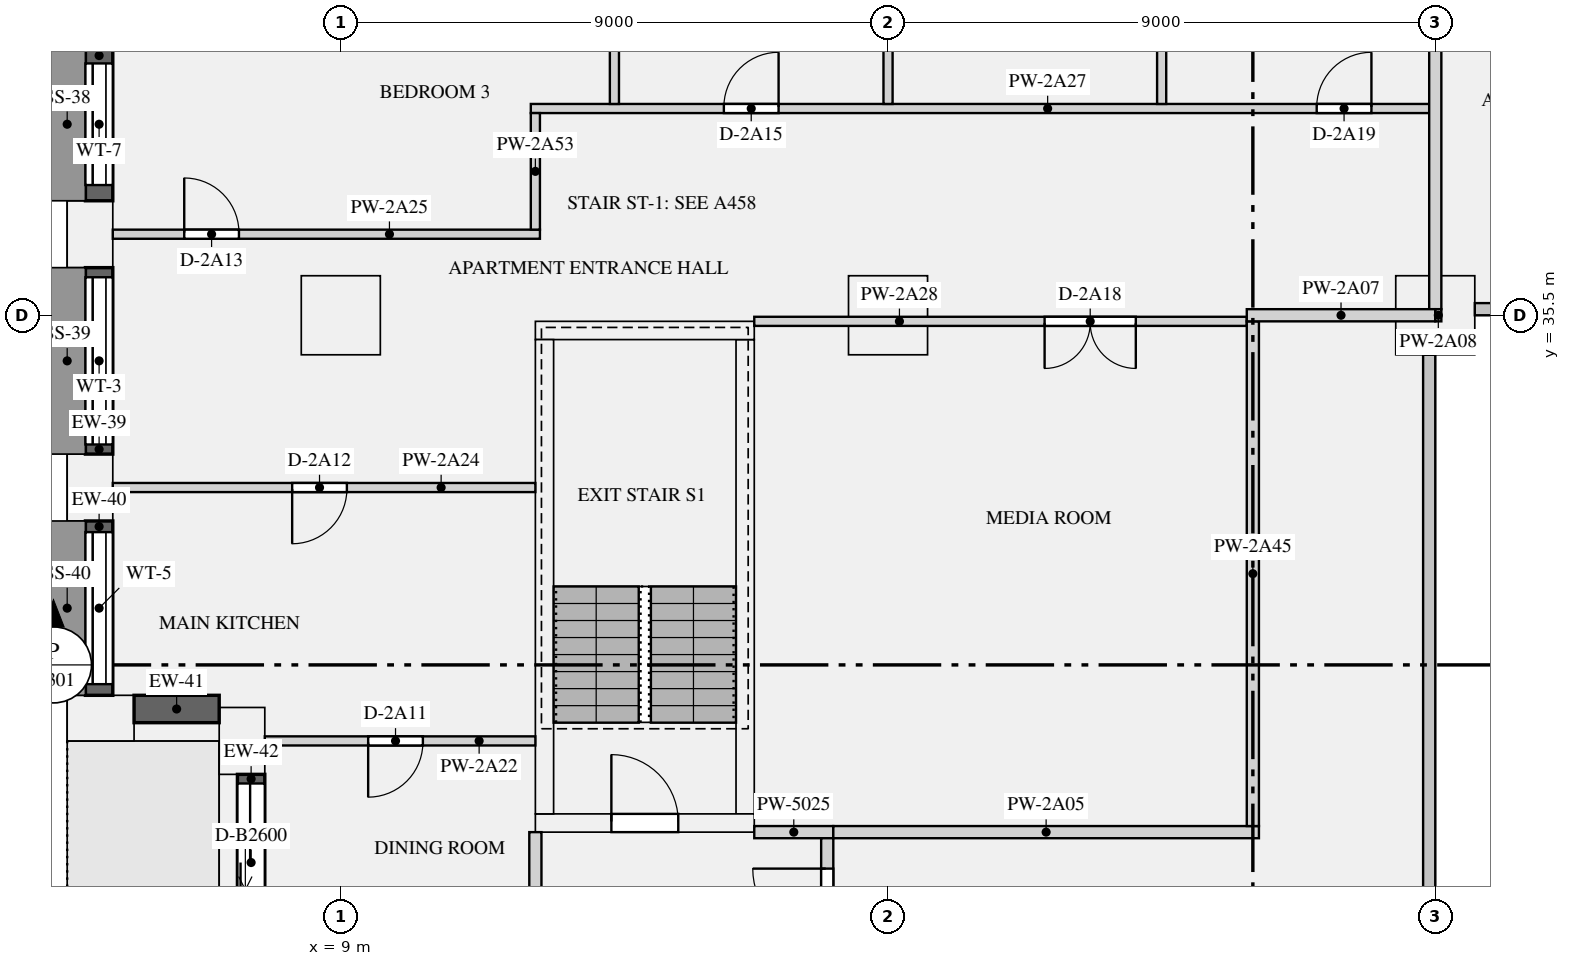
"""IFC4 building model, lengths in metres.
Left out: names, types, materials, properties, quantities, classifications, styles, units other than length and angle.
Written with IfcOpenShell. Run it as: python <this file> out.ifc"""

import sys

from ifc_helpers import new_model, si_unit, direction, frame, frame_2d, origin, origin_2d, place, context, subcontext, project, spatial, rectangle, extrude, element, fill, save


model = new_model("IFC4")
c1 = context("Model", 3, precision=1e-05, world=origin(), true_north=direction((0.0, 1.0)))
c2 = subcontext(c1, "Body", "Model", "MODEL_VIEW")
j1 = project(units=[si_unit("LENGTHUNIT", "METRE"), si_unit("PLANEANGLEUNIT", "RADIAN")], contexts=[c1])
p1 = place(None, origin())
s1 = spatial("IfcSite", under=j1, at=p1, CompositionType="ELEMENT")
p2 = place(p1, origin())
s2 = spatial("IfcBuilding", under=s1, at=p2, CompositionType="ELEMENT")
p3 = place(p2, frame((0.0, 0.0, 83.55)))
s3 = spatial("IfcBuildingStorey", under=s2, at=p3, CompositionType="ELEMENT", Elevation=83.55)
for number, where, z_axis, x_axis in (
    (1, (4.875, 36.833, 0.0), (0.0, 0.0, 1.0), (0.0, -1.0, 0.0)),
    (2, (4.875, 32.667, 0.0), (0.0, 0.0, 1.0), (0.0, -1.0, 0.0)),
    (3, (5.05, 28.875, 0.0), (0.0, 0.0, 1.0), (1.0, 0.0, 0.0)),
    (4, (7.375, 28.5, 0.0), (0.0, 0.0, 1.0), (0.0, -1.0, 0.0)),
):
    element("IfcColumn", number, at=place(p3, frame(where, z_axis=z_axis, x_axis=x_axis)), inside=s3, PredefinedType="USERDEFINED", context=c2, shape_type="SweptSolid", body=[
        extrude(rectangle(XDim=1.1, YDim=0.75, at=origin_2d()), origin(), (0.0, 0.0, 1.0), 3.15),
    ])
for number, where, z_axis, x_axis in (
    (5, (9.0, 35.5, 0.0), (0.0, 0.0, 1.0), (1.0, 0.0, 0.0)),
    (6, (18.0, 35.5, 0.0), (0.0, 0.0, 1.0), (1.0, 0.0, 0.0)),
    (7, (27.0, 35.5, 0.0), (0.0, 0.0, 1.0), (1.0, 0.0, 0.0)),
):
    element("IfcColumn", number, at=place(p3, frame(where, z_axis=z_axis, x_axis=x_axis)), inside=s3, PredefinedType="COLUMN", context=c2, shape_type="SweptSolid", body=[
        extrude(rectangle(XDim=1.3, YDim=1.3, at=origin_2d()), origin(), (0.0, 0.0, 1.0), 3.15),
    ])
p4 = place(p3, frame((12.2, 27.15, 0.0), z_axis=(0.0, 0.0, 1.0), x_axis=(1.0, 0.0, 0.0)))
e8 = element("IfcWall", 8, at=p4, inside=s3, PredefinedType="SHEAR", context=c2, shape_type="SweptSolid", body=[
    extrude(rectangle(XDim=3.6, YDim=0.3, at=frame_2d((1.8, 0.0))), origin(), (0.0, 0.0, 1.0), 3.15),
])
p5 = place(p4, frame((1.25, 0.0, 0.0)))
e9 = element("IfcOpeningElement", 9, at=p5, cuts=e8, PredefinedType="OPENING", context=c2, shape_type="SweptSolid", body=[
    extrude(rectangle(XDim=1.1, YDim=2.1, at=frame_2d((0.55, 1.05))), frame((0.0, 0.16, 0.0), z_axis=(0.0, -1.0, 0.0), x_axis=(1.0, 0.0, 0.0)), (0.0, 0.0, 1.0), 0.32),
])
p6 = place(p3, frame((12.2, 35.25, 0.0), z_axis=(0.0, 0.0, 1.0), x_axis=(1.0, 0.0, 0.0)))
e10 = element("IfcWall", 10, at=p6, inside=s3, PredefinedType="SHEAR", context=c2, shape_type="SweptSolid", body=[
    extrude(rectangle(XDim=3.6, YDim=0.3, at=frame_2d((1.8, 0.0))), origin(), (0.0, 0.0, 1.0), 3.15),
])
for number, where, z_axis, x_axis in (
    (11, (12.35, 27.3, 0.0), (0.0, 0.0, 1.0), (0.0, 1.0, 0.0)),
    (12, (15.65, 27.3, 0.0), (0.0, 0.0, 1.0), (0.0, 1.0, 0.0)),
):
    element("IfcWall", number, at=place(p3, frame(where, z_axis=z_axis, x_axis=x_axis)), inside=s3, PredefinedType="SHEAR", context=c2, shape_type="SweptSolid", body=[
        extrude(rectangle(XDim=7.8, YDim=0.3, at=frame_2d((3.9, 0.0))), origin(), (0.0, 0.0, 1.0), 3.15),
    ])
p7 = place(p3, frame((5.025, 39.9, 0.9), z_axis=(0.0, 0.0, 1.0), x_axis=(0.0, -1.0, 0.0)))
e13 = element("IfcWall", 13, at=p7, inside=s3, PredefinedType="SOLIDWALL", context=c2, shape_type="SweptSolid", body=[
    extrude(rectangle(XDim=2.517, YDim=0.45, at=frame_2d((1.258, 0.0))), origin(), (0.0, 0.0, 1.0), 1.93),
])
p8 = place(p7, frame((0.259, 0.0, 0.15)))
e14 = element("IfcOpeningElement", 14, at=p8, cuts=e13, PredefinedType="OPENING", context=c2, shape_type="SweptSolid", body=[
    extrude(rectangle(XDim=2.0, YDim=1.5, at=frame_2d((1.0, 0.75))), frame((0.0, 0.235, 0.0), z_axis=(0.0, -1.0, 0.0), x_axis=(1.0, 0.0, 0.0)), (0.0, 0.0, 1.0), 0.47),
])
p9 = place(p3, frame((5.025, 36.283, 0.9), z_axis=(0.0, 0.0, 1.0), x_axis=(0.0, -1.0, 0.0)))
e15 = element("IfcWall", 15, at=p9, inside=s3, PredefinedType="SOLIDWALL", context=c2, shape_type="SweptSolid", body=[
    extrude(rectangle(XDim=3.066, YDim=0.45, at=frame_2d((1.533, 0.0))), origin(), (0.0, 0.0, 1.0), 1.93),
])
p10 = place(p9, frame((0.158, 0.0, 0.15)))
e16 = element("IfcOpeningElement", 16, at=p10, cuts=e15, PredefinedType="OPENING", context=c2, shape_type="SweptSolid", body=[
    extrude(rectangle(XDim=2.75, YDim=1.5, at=frame_2d((1.375, 0.75))), frame((0.0, 0.235, 0.0), z_axis=(0.0, -1.0, 0.0), x_axis=(1.0, 0.0, 0.0)), (0.0, 0.0, 1.0), 0.47),
])
p11 = place(p3, frame((5.025, 32.117, 0.9), z_axis=(0.0, 0.0, 1.0), x_axis=(0.0, -1.0, 0.0)))
e17 = element("IfcWall", 17, at=p11, inside=s3, PredefinedType="SOLIDWALL", context=c2, shape_type="SweptSolid", body=[
    extrude(rectangle(XDim=2.867, YDim=0.45, at=frame_2d((1.434, 0.0))), origin(), (0.0, 0.0, 1.0), 1.93),
])
p12 = place(p11, frame((0.184, 0.0, 0.15)))
e18 = element("IfcOpeningElement", 18, at=p12, cuts=e17, PredefinedType="OPENING", context=c2, shape_type="SweptSolid", body=[
    extrude(rectangle(XDim=2.5, YDim=1.5, at=frame_2d((1.25, 0.75))), frame((0.0, 0.235, 0.0), z_axis=(0.0, -1.0, 0.0), x_axis=(1.0, 0.0, 0.0)), (0.0, 0.0, 1.0), 0.47),
])
p13 = place(p3, frame((5.6, 29.025, 0.9), z_axis=(0.0, 0.0, 1.0), x_axis=(1.0, 0.0, 0.0)))
e19 = element("IfcWall", 19, at=p13, inside=s3, PredefinedType="SOLIDWALL", context=c2, shape_type="SweptSolid", body=[
    extrude(rectangle(XDim=1.4, YDim=0.45, at=frame_2d((0.7, 0.0))), origin(), (0.0, 0.0, 1.0), 1.93),
])
p14 = place(p3, frame((7.525, 27.95, 0.0), z_axis=(0.0, 0.0, 1.0), x_axis=(0.0, -1.0, 0.0)))
e20 = element("IfcWall", 20, at=p14, inside=s3, PredefinedType="SOLIDWALL", context=c2, shape_type="SweptSolid", body=[
    extrude(rectangle(XDim=2.9, YDim=0.45, at=frame_2d((1.45, 0.0))), origin(), (0.0, 0.0, 1.0), 2.83),
])
p15 = place(p14, frame((0.15, 0.0, 0.0)))
e21 = element("IfcOpeningElement", 21, at=p15, cuts=e20, PredefinedType="OPENING", context=c2, shape_type="SweptSolid", body=[
    extrude(rectangle(XDim=2.6, YDim=2.3, at=frame_2d((1.3, 1.15))), frame((0.0, 0.235, 0.0), z_axis=(0.0, -1.0, 0.0), x_axis=(1.0, 0.0, 0.0)), (0.0, 0.0, 1.0), 0.47),
])
p16 = place(p3, frame((15.8, 27.0, 0.0), z_axis=(0.0, 0.0, 1.0), x_axis=(1.0, 0.0, 0.0)))
e22 = element("IfcWall", 22, at=p16, inside=s3, PredefinedType="PARTITIONING", context=c2, shape_type="SweptSolid", body=[
    extrude(rectangle(XDim=1.3, YDim=0.2, at=frame_2d((0.65, 0.0))), origin(), (0.0, 0.0, 1.0), 2.83),
])
p17 = place(p3, frame((12.2, 23.1, 0.0), z_axis=(0.0, 0.0, 1.0), x_axis=(0.0, 1.0, 0.0)))
e23 = element("IfcWall", 23, at=p17, inside=s3, PredefinedType="PARTITIONING", context=c2, shape_type="SweptSolid", body=[
    extrude(rectangle(XDim=3.9, YDim=0.2, at=frame_2d((1.95, 0.0))), origin(), (0.0, 0.0, 1.0), 2.83),
])
p18 = place(p3, frame((17.0, 23.1, 0.0), z_axis=(0.0, 0.0, 1.0), x_axis=(0.0, 1.0, 0.0)))
e24 = element("IfcWall", 24, at=p18, inside=s3, PredefinedType="PARTITIONING", context=c2, shape_type="SweptSolid", body=[
    extrude(rectangle(XDim=3.8, YDim=0.2, at=frame_2d((1.9, 0.0))), origin(), (0.0, 0.0, 1.0), 2.83),
])
p19 = place(p18, frame((2.1, 0.0, 0.0)))
e25 = element("IfcOpeningElement", 25, at=p19, cuts=e24, PredefinedType="OPENING", context=c2, shape_type="SweptSolid", body=[
    extrude(rectangle(XDim=1.2, YDim=2.1, at=frame_2d((0.6, 1.05))), frame((0.0, 0.11, 0.0), z_axis=(0.0, -1.0, 0.0), x_axis=(1.0, 0.0, 0.0)), (0.0, 0.0, 1.0), 0.22),
])
p20 = place(p3, frame((17.1, 27.0, 0.0), z_axis=(0.0, 0.0, 1.0), x_axis=(1.0, 0.0, 0.0)))
e26 = element("IfcWall", 26, at=p20, inside=s3, PredefinedType="PARTITIONING", context=c2, shape_type="SweptSolid", body=[
    extrude(rectangle(XDim=7.0, YDim=0.2, at=frame_2d((3.5, 0.0))), origin(), (0.0, 0.0, 1.0), 2.83),
])
p21 = place(p3, frame((23.9, 35.5, 0.0), z_axis=(0.0, 0.0, 1.0), x_axis=(1.0, 0.0, 0.0)))
e27 = element("IfcWall", 27, at=p21, inside=s3, PredefinedType="PARTITIONING", context=c2, shape_type="SweptSolid", body=[
    extrude(rectangle(XDim=3.1, YDim=0.2, at=frame_2d((1.55, 0.0))), origin(), (0.0, 0.0, 1.0), 2.83),
])
p22 = place(p3, frame((27.0, 35.5, 0.0), z_axis=(0.0, 0.0, 1.0), x_axis=(1.0, 0.0, 0.0)))
e28 = element("IfcWall", 28, at=p22, inside=s3, PredefinedType="PARTITIONING", context=c2, shape_type="SweptSolid", body=[
    extrude(rectangle(XDim=0.1, YDim=0.2, at=frame_2d((0.05, 0.0))), origin(), (0.0, 0.0, 1.0), 2.83),
])
p23 = place(p3, frame((7.75, 28.5, 0.0), z_axis=(0.0, 0.0, 1.0), x_axis=(1.0, 0.0, 0.0)))
e29 = element("IfcWall", 29, at=p23, inside=s3, PredefinedType="PARTITIONING", context=c2, shape_type="SweptSolid", body=[
    extrude(rectangle(XDim=4.45, YDim=0.15, at=frame_2d((2.225, 0.0))), origin(), (0.0, 0.0, 1.0), 2.83),
])
p24 = place(p23, frame((1.7, 0.0, 0.0)))
e30 = element("IfcOpeningElement", 30, at=p24, cuts=e29, PredefinedType="OPENING", context=c2, shape_type="SweptSolid", body=[
    extrude(rectangle(XDim=0.9, YDim=2.1, at=frame_2d((0.45, 1.05))), frame((0.0, 0.085, 0.0), z_axis=(0.0, -1.0, 0.0), x_axis=(1.0, 0.0, 0.0)), (0.0, 0.0, 1.0), 0.17),
])
p25 = place(p3, frame((5.25, 32.667, 0.0), z_axis=(0.0, 0.0, 1.0), x_axis=(1.0, 0.0, 0.0)))
e31 = element("IfcWall", 31, at=p25, inside=s3, PredefinedType="PARTITIONING", context=c2, shape_type="SweptSolid", body=[
    extrude(rectangle(XDim=6.95, YDim=0.15, at=frame_2d((3.475, 0.0))), origin(), (0.0, 0.0, 1.0), 2.83),
])
p26 = place(p25, frame((2.95, 0.0, 0.0)))
e32 = element("IfcOpeningElement", 32, at=p26, cuts=e31, PredefinedType="OPENING", context=c2, shape_type="SweptSolid", body=[
    extrude(rectangle(XDim=0.9, YDim=2.1, at=frame_2d((0.45, 1.05))), frame((0.0, 0.085, 0.0), z_axis=(0.0, -1.0, 0.0), x_axis=(1.0, 0.0, 0.0)), (0.0, 0.0, 1.0), 0.17),
])
p27 = place(p3, frame((5.25, 36.833, 0.0), z_axis=(0.0, 0.0, 1.0), x_axis=(1.0, 0.0, 0.0)))
e33 = element("IfcWall", 33, at=p27, inside=s3, PredefinedType="PARTITIONING", context=c2, shape_type="SweptSolid", body=[
    extrude(rectangle(XDim=7.025, YDim=0.15, at=frame_2d((3.512, 0.0))), origin(), (0.0, 0.0, 1.0), 2.83),
])
p28 = place(p27, frame((1.175, 0.0, 0.0)))
e34 = element("IfcOpeningElement", 34, at=p28, cuts=e33, PredefinedType="OPENING", context=c2, shape_type="SweptSolid", body=[
    extrude(rectangle(XDim=0.9, YDim=2.1, at=frame_2d((0.45, 1.05))), frame((0.0, 0.085, 0.0), z_axis=(0.0, -1.0, 0.0), x_axis=(1.0, 0.0, 0.0)), (0.0, 0.0, 1.0), 0.17),
])
p29 = place(p3, frame((12.125, 38.9, 0.0), z_axis=(0.0, 0.0, 1.0), x_axis=(1.0, 0.0, 0.0)))
e35 = element("IfcWall", 35, at=p29, inside=s3, PredefinedType="PARTITIONING", context=c2, shape_type="SweptSolid", body=[
    extrude(rectangle(XDim=14.775, YDim=0.15, at=frame_2d((7.387, 0.0))), origin(), (0.0, 0.0, 1.0), 2.83),
])
p30 = place(p29, frame((3.175, 0.0, 0.0)))
e36 = element("IfcOpeningElement", 36, at=p30, cuts=e35, PredefinedType="OPENING", context=c2, shape_type="SweptSolid", body=[
    extrude(rectangle(XDim=0.9, YDim=2.1, at=frame_2d((0.45, 1.05))), frame((0.0, 0.085, 0.0), z_axis=(0.0, -1.0, 0.0), x_axis=(1.0, 0.0, 0.0)), (0.0, 0.0, 1.0), 0.17),
])
p31 = place(p29, frame((12.925, 0.0, 0.0)))
e37 = element("IfcOpeningElement", 37, at=p31, cuts=e35, PredefinedType="OPENING", context=c2, shape_type="SweptSolid", body=[
    extrude(rectangle(XDim=0.9, YDim=2.1, at=frame_2d((0.45, 1.05))), frame((0.0, 0.085, 0.0), z_axis=(0.0, -1.0, 0.0), x_axis=(1.0, 0.0, 0.0)), (0.0, 0.0, 1.0), 0.17),
])
p32 = place(p3, frame((15.8, 35.4, 0.0), z_axis=(0.0, 0.0, 1.0), x_axis=(1.0, 0.0, 0.0)))
e38 = element("IfcWall", 38, at=p32, inside=s3, PredefinedType="PARTITIONING", context=c2, shape_type="SweptSolid", body=[
    extrude(rectangle(XDim=8.1, YDim=0.15, at=frame_2d((4.05, 0.0))), origin(), (0.0, 0.0, 1.0), 2.83),
])
p33 = place(p32, frame((4.775, 0.0, 0.0)))
e39 = element("IfcOpeningElement", 39, at=p33, cuts=e38, PredefinedType="OPENING", context=c2, shape_type="SweptSolid", body=[
    extrude(rectangle(XDim=1.5, YDim=2.1, at=frame_2d((0.75, 1.05))), frame((0.0, 0.085, 0.0), z_axis=(0.0, -1.0, 0.0), x_axis=(1.0, 0.0, 0.0)), (0.0, 0.0, 1.0), 0.17),
])
p34 = place(p3, frame((18.0, 38.975, 0.0), z_axis=(0.0, 0.0, 1.0), x_axis=(0.0, 1.0, 0.0)))
e40 = element("IfcWall", 40, at=p34, inside=s3, PredefinedType="PARTITIONING", context=c2, shape_type="SweptSolid", body=[
    extrude(rectangle(XDim=5.775, YDim=0.15, at=frame_2d((2.887, 0.0))), origin(), (0.0, 0.0, 1.0), 2.83),
])
p35 = place(p34, frame((0.975, 0.0, 0.0)))
e41 = element("IfcOpeningElement", 41, at=p35, cuts=e40, PredefinedType="OPENING", context=c2, shape_type="SweptSolid", body=[
    extrude(rectangle(XDim=0.9, YDim=2.1, at=frame_2d((0.45, 1.05))), frame((0.0, 0.085, 0.0), z_axis=(0.0, -1.0, 0.0), x_axis=(1.0, 0.0, 0.0)), (0.0, 0.0, 1.0), 0.17),
])
p36 = place(p34, frame((3.975, 0.0, 0.0)))
e42 = element("IfcOpeningElement", 42, at=p36, cuts=e40, PredefinedType="OPENING", context=c2, shape_type="SweptSolid", body=[
    extrude(rectangle(XDim=0.9, YDim=2.1, at=frame_2d((0.45, 1.05))), frame((0.0, 0.085, 0.0), z_axis=(0.0, -1.0, 0.0), x_axis=(1.0, 0.0, 0.0)), (0.0, 0.0, 1.0), 0.17),
])
p37 = place(p3, frame((24.0, 27.1, 0.0), z_axis=(0.0, 0.0, 1.0), x_axis=(0.0, 1.0, 0.0)))
e43 = element("IfcWall", 43, at=p37, inside=s3, PredefinedType="PARTITIONING", context=c2, shape_type="SweptSolid", body=[
    extrude(rectangle(XDim=8.3, YDim=0.2, at=frame_2d((4.15, 0.0))), origin(), (0.0, 0.0, 1.0), 2.83),
])
p38 = place(p3, frame((13.5, 38.975, 0.0), z_axis=(0.0, 0.0, 1.0), x_axis=(0.0, 1.0, 0.0)))
e44 = element("IfcWall", 44, at=p38, inside=s3, PredefinedType="PARTITIONING", context=c2, shape_type="SweptSolid", body=[
    extrude(rectangle(XDim=5.775, YDim=0.15, at=frame_2d((2.887, 0.0))), origin(), (0.0, 0.0, 1.0), 2.83),
])
p39 = place(p3, frame((12.2, 36.908, 0.0), z_axis=(0.0, 0.0, 1.0), x_axis=(0.0, 1.0, 0.0)))
e45 = element("IfcWall", 45, at=p39, inside=s3, PredefinedType="PARTITIONING", context=c2, shape_type="SweptSolid", body=[
    extrude(rectangle(XDim=1.917, YDim=0.15, at=frame_2d((0.958, 0.0))), origin(), (0.0, 0.0, 1.0), 2.83),
])
p40 = place(p3, frame((27.0, 35.6, 0.0), z_axis=(0.0, 0.0, 1.0), x_axis=(0.0, 1.0, 0.0)))
e46 = element("IfcWall", 46, at=p40, inside=s3, PredefinedType="PARTITIONING", context=c2, shape_type="SweptSolid", body=[
    extrude(rectangle(XDim=9.15, YDim=0.2, at=frame_2d((4.575, 0.0))), origin(), (0.0, 0.0, 1.0), 2.83),
])
p41 = place(p3, frame((22.5, 38.975, 0.0), z_axis=(0.0, 0.0, 1.0), x_axis=(0.0, 1.0, 0.0)))
e47 = element("IfcWall", 47, at=p41, inside=s3, PredefinedType="PARTITIONING", context=c2, shape_type="SweptSolid", body=[
    extrude(rectangle(XDim=5.775, YDim=0.15, at=frame_2d((2.887, 0.0))), origin(), (0.0, 0.0, 1.0), 2.83),
])
p42 = place(p8, origin())
e48 = element("IfcWindow", 48, at=p42, inside=s3, PartitioningType="SINGLE_PANEL", PredefinedType="WINDOW", context=c2, shape_type="SweptSolid", body=[
    extrude(rectangle(XDim=2.0, YDim=1.5, at=frame_2d((1.0, 0.75))), frame((0.0, -0.065, 0.0), z_axis=(0.0, -1.0, 0.0), x_axis=(1.0, 0.0, 0.0)), (0.0, 0.0, 1.0), 0.06),
])
fill(e14, e48)
p43 = place(p10, origin())
e49 = element("IfcWindow", 49, at=p43, inside=s3, PartitioningType="SINGLE_PANEL", PredefinedType="WINDOW", context=c2, shape_type="SweptSolid", body=[
    extrude(rectangle(XDim=2.75, YDim=1.5, at=frame_2d((1.375, 0.75))), frame((0.0, -0.065, 0.0), z_axis=(0.0, -1.0, 0.0), x_axis=(1.0, 0.0, 0.0)), (0.0, 0.0, 1.0), 0.06),
])
fill(e16, e49)
p44 = place(p12, origin())
e50 = element("IfcWindow", 50, at=p44, inside=s3, PartitioningType="SINGLE_PANEL", PredefinedType="WINDOW", context=c2, shape_type="SweptSolid", body=[
    extrude(rectangle(XDim=2.5, YDim=1.5, at=frame_2d((1.25, 0.75))), frame((0.0, -0.065, 0.0), z_axis=(0.0, -1.0, 0.0), x_axis=(1.0, 0.0, 0.0)), (0.0, 0.0, 1.0), 0.06),
])
fill(e18, e50)
p45 = place(p15, origin())
e51 = element("IfcDoor", 51, at=p45, inside=s3, OperationType="SLIDING_TO_LEFT", PredefinedType="DOOR", context=c2, shape_type="SweptSolid", body=[
    extrude(rectangle(XDim=2.6, YDim=2.3, at=frame_2d((1.3, 1.15))), frame((0.0, -0.07, 0.0), z_axis=(0.0, -1.0, 0.0), x_axis=(1.0, 0.0, 0.0)), (0.0, 0.0, 1.0), 0.05),
])
fill(e21, e51)
p46 = place(p5, origin())
e52 = element("IfcDoor", 52, at=p46, inside=s3, OperationType="SINGLE_SWING_LEFT", PredefinedType="DOOR", context=c2, shape_type="SweptSolid", body=[
    extrude(rectangle(XDim=1.1, YDim=2.1, at=frame_2d((0.55, 1.05))), frame((0.0, 0.025, 0.0), z_axis=(0.0, -1.0, 0.0), x_axis=(1.0, 0.0, 0.0)), (0.0, 0.0, 1.0), 0.05),
])
fill(e9, e52)
p47 = place(p19, origin())
e53 = element("IfcDoor", 53, at=p47, inside=s3, OperationType="SINGLE_SWING_RIGHT", PredefinedType="DOOR", context=c2, shape_type="SweptSolid", body=[
    extrude(rectangle(XDim=1.2, YDim=2.1, at=frame_2d((0.6, 1.05))), frame((0.0, 0.025, 0.0), z_axis=(0.0, -1.0, 0.0), x_axis=(1.0, 0.0, 0.0)), (0.0, 0.0, 1.0), 0.05),
])
fill(e25, e53)
p48 = place(p24, frame((0.9, 0.0, 0.0), z_axis=(0.0, 0.0, 1.0), x_axis=(-1.0, 0.0, 0.0)))
e54 = element("IfcDoor", 54, at=p48, inside=s3, OperationType="SINGLE_SWING_RIGHT", PredefinedType="DOOR", context=c2, shape_type="SweptSolid", body=[
    extrude(rectangle(XDim=0.9, YDim=2.1, at=frame_2d((0.45, 1.05))), frame((0.0, 0.025, 0.0), z_axis=(0.0, -1.0, 0.0), x_axis=(1.0, 0.0, 0.0)), (0.0, 0.0, 1.0), 0.05),
])
fill(e30, e54)
p49 = place(p26, frame((0.9, 0.0, 0.0), z_axis=(0.0, 0.0, 1.0), x_axis=(-1.0, 0.0, 0.0)))
e55 = element("IfcDoor", 55, at=p49, inside=s3, OperationType="SINGLE_SWING_RIGHT", PredefinedType="DOOR", context=c2, shape_type="SweptSolid", body=[
    extrude(rectangle(XDim=0.9, YDim=2.1, at=frame_2d((0.45, 1.05))), frame((0.0, 0.025, 0.0), z_axis=(0.0, -1.0, 0.0), x_axis=(1.0, 0.0, 0.0)), (0.0, 0.0, 1.0), 0.05),
])
fill(e32, e55)
p50 = place(p28, origin())
e56 = element("IfcDoor", 56, at=p50, inside=s3, OperationType="SINGLE_SWING_LEFT", PredefinedType="DOOR", context=c2, shape_type="SweptSolid", body=[
    extrude(rectangle(XDim=0.9, YDim=2.1, at=frame_2d((0.45, 1.05))), frame((0.0, 0.025, 0.0), z_axis=(0.0, -1.0, 0.0), x_axis=(1.0, 0.0, 0.0)), (0.0, 0.0, 1.0), 0.05),
])
fill(e34, e56)
p51 = place(p30, origin())
e57 = element("IfcDoor", 57, at=p51, inside=s3, OperationType="SINGLE_SWING_RIGHT", PredefinedType="DOOR", context=c2, shape_type="SweptSolid", body=[
    extrude(rectangle(XDim=0.9, YDim=2.1, at=frame_2d((0.45, 1.05))), frame((0.0, 0.025, 0.0), z_axis=(0.0, -1.0, 0.0), x_axis=(1.0, 0.0, 0.0)), (0.0, 0.0, 1.0), 0.05),
])
fill(e36, e57)
p52 = place(p33, frame((1.5, 0.0, 0.0), z_axis=(0.0, 0.0, 1.0), x_axis=(-1.0, 0.0, 0.0)))
e58 = element("IfcDoor", 58, at=p52, inside=s3, OperationType="DOUBLE_DOOR_SINGLE_SWING", PredefinedType="DOOR", context=c2, shape_type="SweptSolid", body=[
    extrude(rectangle(XDim=1.5, YDim=2.1, at=frame_2d((0.75, 1.05))), frame((0.0, 0.025, 0.0), z_axis=(0.0, -1.0, 0.0), x_axis=(1.0, 0.0, 0.0)), (0.0, 0.0, 1.0), 0.05),
])
fill(e39, e58)
p53 = place(p31, origin())
e59 = element("IfcDoor", 59, at=p53, inside=s3, OperationType="SINGLE_SWING_RIGHT", PredefinedType="DOOR", context=c2, shape_type="SweptSolid", body=[
    extrude(rectangle(XDim=0.9, YDim=2.1, at=frame_2d((0.45, 1.05))), frame((0.0, 0.025, 0.0), z_axis=(0.0, -1.0, 0.0), x_axis=(1.0, 0.0, 0.0)), (0.0, 0.0, 1.0), 0.05),
])
fill(e37, e59)
save(model, sys.argv[1])
